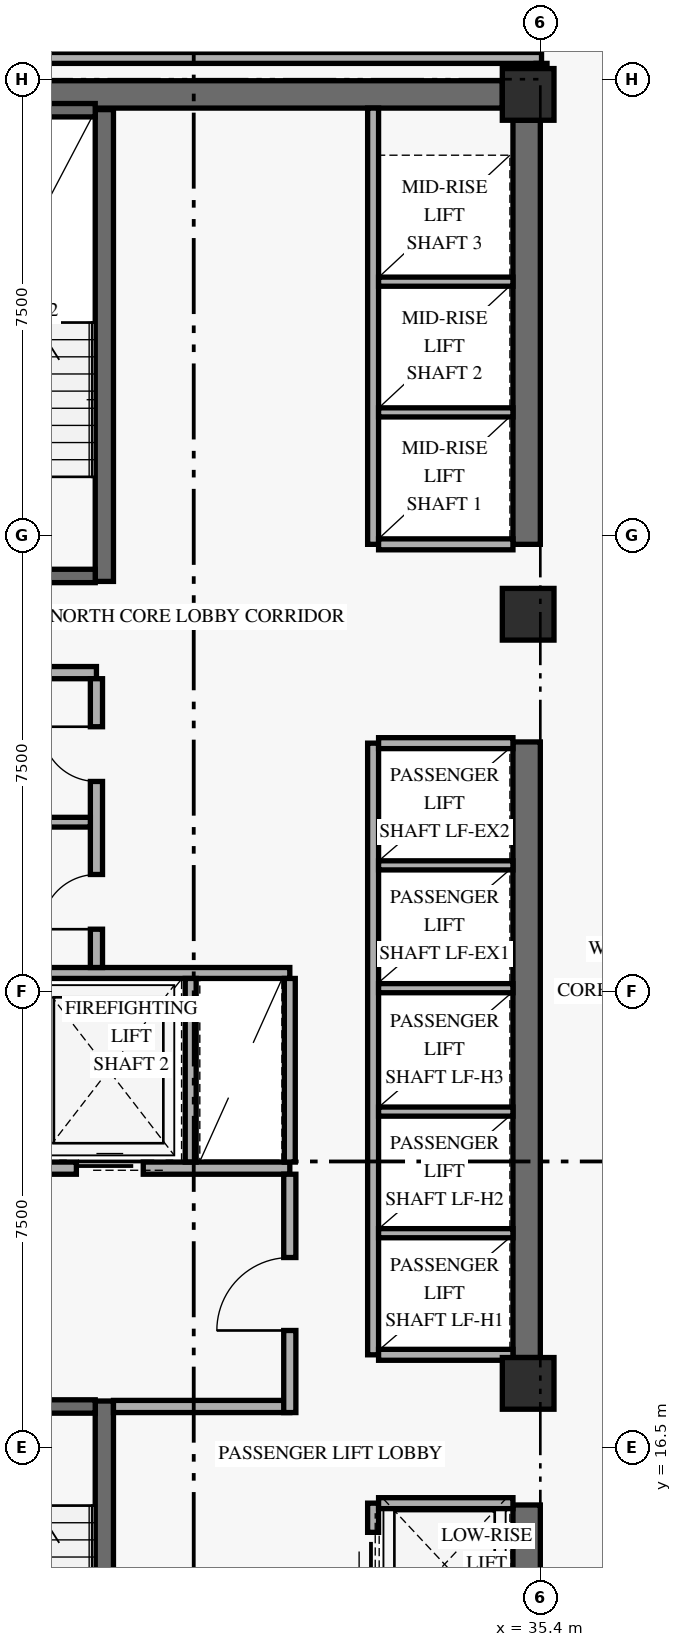
"""IFC4 building model, lengths in metres.
Left out: names, types, materials, properties, quantities, classifications, styles, units other than length and angle.
Written with IfcOpenShell. Run it as: python <this file> out.ifc"""

import sys

from ifc_helpers import new_model, si_unit, direction, frame, frame_2d, origin, origin_2d, place, context, subcontext, project, spatial, rectangle, extrude, element, fill, save


model = new_model("IFC4")
c1 = context("Model", 3, precision=1e-05, world=origin(), true_north=direction((0.0, 1.0)))
c2 = subcontext(c1, "Body", "Model", "MODEL_VIEW")
j1 = project(units=[si_unit("LENGTHUNIT", "METRE"), si_unit("PLANEANGLEUNIT", "RADIAN")], contexts=[c1])
p1 = place(None, origin())
s1 = spatial("IfcSite", under=j1, at=p1, CompositionType="ELEMENT")
p2 = place(p1, origin())
s2 = spatial("IfcBuilding", under=s1, at=p2, CompositionType="ELEMENT")
p3 = place(p2, frame((0.0, 0.0, 76.8)))
s3 = spatial("IfcBuildingStorey", under=s2, at=p3, CompositionType="ELEMENT", Elevation=76.8)
p4 = place(p3, frame((35.175, 9.675, 0.0), z_axis=(0.0, 0.0, 1.0), x_axis=(0.0, 1.0, 0.0)))
e1 = element("IfcWall", 1, at=p4, inside=s3, PredefinedType="SHEAR", context=c2, shape_type="SweptSolid", body=[
    extrude(rectangle(XDim=5.875, YDim=0.45, at=frame_2d((2.938, 0.0))), origin(), (0.0, 0.0, 1.0), 2.749),
])
p5 = place(p3, frame((35.175, 17.975, 0.0), z_axis=(0.0, 0.0, 1.0), x_axis=(0.0, 1.0, 0.0)))
e2 = element("IfcWall", 2, at=p5, inside=s3, PredefinedType="SHEAR", context=c2, shape_type="SweptSolid", body=[
    extrude(rectangle(XDim=10.125, YDim=0.45, at=frame_2d((5.062, 0.0))), origin(), (0.0, 0.0, 1.0), 2.749),
])
p6 = place(p3, frame((35.175, 31.35, 0.0), z_axis=(0.0, 0.0, 1.0), x_axis=(0.0, 1.0, 0.0)))
e3 = element("IfcWall", 3, at=p6, inside=s3, PredefinedType="SHEAR", context=c2, shape_type="SweptSolid", body=[
    extrude(rectangle(XDim=6.975, YDim=0.45, at=frame_2d((3.487, 0.0))), origin(), (0.0, 0.0, 1.0), 2.749),
])
p7 = place(p3, frame((24.625, 38.75, 0.0), z_axis=(0.0, 0.0, 1.0), x_axis=(1.0, 0.0, 0.0)))
e4 = element("IfcWall", 4, at=p7, inside=s3, PredefinedType="SHEAR", context=c2, shape_type="SweptSolid", body=[
    extrude(rectangle(XDim=10.15, YDim=0.45, at=frame_2d((5.075, 0.0))), origin(), (0.0, 0.0, 1.0), 3.36),
])
p8 = place(p3, frame((28.23, 9.5, 0.0), z_axis=(0.0, 0.0, 1.0), x_axis=(0.0, 1.0, 0.0)))
e5 = element("IfcWall", 5, at=p8, inside=s3, PredefinedType="SHEAR", context=c2, shape_type="SweptSolid", body=[
    extrude(rectangle(XDim=7.76, YDim=0.3, at=frame_2d((3.88, 0.0))), origin(), (0.0, 0.0, 1.0), 3.36),
])
p9 = place(p3, frame((24.92, 17.17, 0.0), z_axis=(0.0, 0.0, 1.0), x_axis=(1.0, 0.0, 0.0)))
e6 = element("IfcWall", 6, at=p9, inside=s3, PredefinedType="SHEAR", context=c2, shape_type="SweptSolid", body=[
    extrude(rectangle(XDim=3.16, YDim=0.22, at=frame_2d((1.58, 0.0))), origin(), (0.0, 0.0, 1.0), 3.36),
])
p10 = place(p9, frame((0.78, 0.0, 0.0)))
e7 = element("IfcOpeningElement", 7, at=p10, cuts=e6, PredefinedType="OPENING", context=c2, shape_type="SweptSolid", body=[
    extrude(rectangle(XDim=1.05, YDim=2.15, at=frame_2d((0.525, 1.075))), frame((0.0, 0.12, 0.0), z_axis=(0.0, -1.0, 0.0), x_axis=(1.0, 0.0, 0.0)), (0.0, 0.0, 1.0), 0.24),
])
p11 = place(p3, frame((28.23, 30.74, 0.0), z_axis=(0.0, 0.0, 1.0), x_axis=(0.0, 1.0, 0.0)))
e8 = element("IfcWall", 8, at=p11, inside=s3, PredefinedType="SHEAR", context=c2, shape_type="SweptSolid", body=[
    extrude(rectangle(XDim=7.76, YDim=0.3, at=frame_2d((3.88, 0.0))), origin(), (0.0, 0.0, 1.0), 3.36),
])
p12 = place(p3, frame((24.92, 30.83, 0.0), z_axis=(0.0, 0.0, 1.0), x_axis=(1.0, 0.0, 0.0)))
e9 = element("IfcWall", 9, at=p12, inside=s3, PredefinedType="SHEAR", context=c2, shape_type="SweptSolid", body=[
    extrude(rectangle(XDim=3.16, YDim=0.22, at=frame_2d((1.58, 0.0))), origin(), (0.0, 0.0, 1.0), 3.36),
])
p13 = place(p12, frame((0.78, 0.0, 0.0)))
e10 = element("IfcOpeningElement", 10, at=p13, cuts=e9, PredefinedType="OPENING", context=c2, shape_type="SweptSolid", body=[
    extrude(rectangle(XDim=1.05, YDim=2.15, at=frame_2d((0.525, 1.075))), frame((0.0, 0.12, 0.0), z_axis=(0.0, -1.0, 0.0), x_axis=(1.0, 0.0, 0.0)), (0.0, 0.0, 1.0), 0.24),
])
p14 = place(p3, frame((24.92, 38.49, 0.0), z_axis=(0.0, 0.0, 1.0), x_axis=(1.0, 0.0, 0.0)))
e11 = element("IfcWall", 11, at=p14, inside=s3, PredefinedType="SHEAR", context=c2, shape_type="SweptSolid", body=[
    extrude(rectangle(XDim=3.16, YDim=0.22, at=frame_2d((1.58, 0.0))), origin(), (0.0, 0.0, 1.0), 3.36),
])
for number, where, z_axis, x_axis in (
    (12, (35.2, 17.55, 0.0), (0.0, 0.0, 1.0), (1.0, 0.0, 0.0)),
    (13, (35.2, 30.2, 0.0), (0.0, 0.0, 1.0), (1.0, 0.0, 0.0)),
    (14, (35.2, 38.75, 0.0), (0.0, 0.0, 1.0), (1.0, 0.0, 0.0)),
):
    element("IfcColumn", number, at=place(p3, frame(where, z_axis=z_axis, x_axis=x_axis)), inside=s3, PredefinedType="COLUMN", context=c2, shape_type="SweptSolid", body=[
        extrude(rectangle(XDim=0.85, YDim=0.85, at=origin_2d()), origin(), (0.0, 0.0, 1.0), 3.6),
    ])
p15 = place(p3, frame((24.45, 21.09, 0.0), z_axis=(0.0, 0.0, 1.0), x_axis=(1.0, 0.0, 0.0)))
e15 = element("IfcWall", 15, at=p15, inside=s3, PredefinedType="STANDARD", context=c2, shape_type="SweptSolid", body=[
    extrude(rectangle(XDim=6.83, YDim=0.2, at=frame_2d((3.415, 0.0))), origin(), (0.0, 0.0, 1.0), 3.36),
])
p16 = place(p15, frame((0.72, 0.0, 0.0)))
e16 = element("IfcOpeningElement", 16, at=p16, cuts=e15, PredefinedType="OPENING", context=c2, shape_type="SweptSolid", body=[
    extrude(rectangle(XDim=1.1, YDim=2.2, at=frame_2d((0.55, 1.1))), frame((0.0, 0.11, 0.0), z_axis=(0.0, -1.0, 0.0), x_axis=(1.0, 0.0, 0.0)), (0.0, 0.0, 1.0), 0.22),
])
p17 = place(p15, frame((3.32, 0.0, 0.0)))
e17 = element("IfcOpeningElement", 17, at=p17, cuts=e15, PredefinedType="OPENING", context=c2, shape_type="SweptSolid", body=[
    extrude(rectangle(XDim=1.1, YDim=2.2, at=frame_2d((0.55, 1.1))), frame((0.0, 0.11, 0.0), z_axis=(0.0, -1.0, 0.0), x_axis=(1.0, 0.0, 0.0)), (0.0, 0.0, 1.0), 0.22),
])
p18 = place(p3, frame((28.38, 17.17, 0.0), z_axis=(0.0, 0.0, 1.0), x_axis=(1.0, 0.0, 0.0)))
e18 = element("IfcWall", 18, at=p18, inside=s3, PredefinedType="STANDARD", context=c2, shape_type="SweptSolid", body=[
    extrude(rectangle(XDim=2.9, YDim=0.2, at=frame_2d((1.45, 0.0))), origin(), (0.0, 0.0, 1.0), 3.36),
])
p19 = place(p3, frame((31.28, 17.07, 0.0), z_axis=(0.0, 0.0, 1.0), x_axis=(0.0, 1.0, 0.0)))
e19 = element("IfcWall", 19, at=p19, inside=s3, PredefinedType="STANDARD", context=c2, shape_type="SweptSolid", body=[
    extrude(rectangle(XDim=3.92, YDim=0.2, at=frame_2d((1.96, 0.0))), origin(), (0.0, 0.0, 1.0), 2.731),
])
p20 = place(p19, frame((1.35, 0.0, 0.0)))
e20 = element("IfcOpeningElement", 20, at=p20, cuts=e19, PredefinedType="OPENING", context=c2, shape_type="SweptSolid", body=[
    extrude(rectangle(XDim=1.2, YDim=2.15, at=frame_2d((0.6, 1.075))), frame((0.0, 0.11, 0.0), z_axis=(0.0, -1.0, 0.0), x_axis=(1.0, 0.0, 0.0)), (0.0, 0.0, 1.0), 0.22),
])
p21 = place(p3, frame((24.45, 24.3, 0.0), z_axis=(0.0, 0.0, 1.0), x_axis=(1.0, 0.0, 0.0)))
e21 = element("IfcWall", 21, at=p21, inside=s3, PredefinedType="STANDARD", context=c2, shape_type="SweptSolid", body=[
    extrude(rectangle(XDim=6.83, YDim=0.18, at=frame_2d((3.415, 0.0))), origin(), (0.0, 0.0, 1.0), 3.36),
])
for number, where, z_axis, x_axis in (
    (22, (29.65, 21.19, 0.0), (0.0, 0.0, 1.0), (0.0, 1.0, 0.0)),
    (23, (31.28, 21.19, 0.0), (0.0, 0.0, 1.0), (0.0, 1.0, 0.0)),
):
    element("IfcWall", number, at=place(p3, frame(where, z_axis=z_axis, x_axis=x_axis)), inside=s3, PredefinedType="STANDARD", context=c2, shape_type="SweptSolid", body=[
        extrude(rectangle(XDim=3.02, YDim=0.18, at=frame_2d((1.51, 0.0))), origin(), (0.0, 0.0, 1.0), 3.36),
    ])
p22 = place(p3, frame((24.45, 29.24, 0.0), z_axis=(0.0, 0.0, 1.0), x_axis=(1.0, 0.0, 0.0)))
e24 = element("IfcWall", 24, at=p22, inside=s3, PredefinedType="STANDARD", context=c2, shape_type="SweptSolid", body=[
    extrude(rectangle(XDim=3.65, YDim=0.2, at=frame_2d((1.825, 0.0))), origin(), (0.0, 0.0, 1.0), 3.36),
])
p23 = place(p3, frame((28.1, 24.39, 0.0), z_axis=(0.0, 0.0, 1.0), x_axis=(0.0, 1.0, 0.0)))
e25 = element("IfcWall", 25, at=p23, inside=s3, PredefinedType="STANDARD", context=c2, shape_type="SweptSolid", body=[
    extrude(rectangle(XDim=4.75, YDim=0.2, at=frame_2d((2.375, 0.0))), origin(), (0.0, 0.0, 1.0), 3.36),
])
p24 = place(p23, frame((0.63, 0.0, 0.0)))
e26 = element("IfcOpeningElement", 26, at=p24, cuts=e25, PredefinedType="OPENING", context=c2, shape_type="SweptSolid", body=[
    extrude(rectangle(XDim=0.9, YDim=2.1, at=frame_2d((0.45, 1.05))), frame((0.0, 0.11, 0.0), z_axis=(0.0, -1.0, 0.0), x_axis=(1.0, 0.0, 0.0)), (0.0, 0.0, 1.0), 0.22),
])
p25 = place(p23, frame((3.06, 0.0, 0.0)))
e27 = element("IfcOpeningElement", 27, at=p25, cuts=e25, PredefinedType="OPENING", context=c2, shape_type="SweptSolid", body=[
    extrude(rectangle(XDim=0.9, YDim=2.1, at=frame_2d((0.45, 1.05))), frame((0.0, 0.11, 0.0), z_axis=(0.0, -1.0, 0.0), x_axis=(1.0, 0.0, 0.0)), (0.0, 0.0, 1.0), 0.22),
])
p26 = place(p3, frame((24.45, 26.78, 0.0), z_axis=(0.0, 0.0, 1.0), x_axis=(1.0, 0.0, 0.0)))
e28 = element("IfcWall", 28, at=p26, inside=s3, PredefinedType="PARTITIONING", context=c2, shape_type="SweptSolid", body=[
    extrude(rectangle(XDim=3.55, YDim=0.16, at=frame_2d((1.775, 0.0))), origin(), (0.0, 0.0, 1.0), 3.36),
])
p27 = place(p3, frame((32.65, 9.5, 0.0), z_axis=(0.0, 0.0, 1.0), x_axis=(0.0, 1.0, 0.0)))
e29 = element("IfcWall", 29, at=p27, inside=s3, PredefinedType="STANDARD", context=c2, shape_type="SweptSolid", body=[
    extrude(rectangle(XDim=6.08, YDim=0.18, at=frame_2d((3.04, 0.0))), origin(), (0.0, 0.0, 1.0), 3.36),
])
p28 = place(p27, frame((0.55, 0.0, 0.0)))
e30 = element("IfcOpeningElement", 30, at=p28, cuts=e29, PredefinedType="OPENING", context=c2, shape_type="SweptSolid", body=[
    extrude(rectangle(XDim=1.05, YDim=2.2, at=frame_2d((0.525, 1.1))), frame((0.0, 0.1, 0.0), z_axis=(0.0, -1.0, 0.0), x_axis=(1.0, 0.0, 0.0)), (0.0, 0.0, 1.0), 0.2),
])
p29 = place(p27, frame((2.55, 0.0, 0.0)))
e31 = element("IfcOpeningElement", 31, at=p29, cuts=e29, PredefinedType="OPENING", context=c2, shape_type="SweptSolid", body=[
    extrude(rectangle(XDim=1.05, YDim=2.2, at=frame_2d((0.525, 1.1))), frame((0.0, 0.1, 0.0), z_axis=(0.0, -1.0, 0.0), x_axis=(1.0, 0.0, 0.0)), (0.0, 0.0, 1.0), 0.2),
])
p30 = place(p27, frame((4.55, 0.0, 0.0)))
e32 = element("IfcOpeningElement", 32, at=p30, cuts=e29, PredefinedType="OPENING", context=c2, shape_type="SweptSolid", body=[
    extrude(rectangle(XDim=1.05, YDim=2.2, at=frame_2d((0.525, 1.1))), frame((0.0, 0.1, 0.0), z_axis=(0.0, -1.0, 0.0), x_axis=(1.0, 0.0, 0.0)), (0.0, 0.0, 1.0), 0.2),
])
p31 = place(p3, frame((32.74, 15.58, 0.0), z_axis=(0.0, 0.0, 1.0), x_axis=(1.0, 0.0, 0.0)))
e33 = element("IfcWall", 33, at=p31, inside=s3, PredefinedType="STANDARD", context=c2, shape_type="SweptSolid", body=[
    extrude(rectangle(XDim=2.21, YDim=0.18, at=frame_2d((1.105, 0.0))), origin(), (0.0, 0.0, 1.0), 3.36),
])
p32 = place(p3, frame((32.65, 18.02, 0.0), z_axis=(0.0, 0.0, 1.0), x_axis=(0.0, 1.0, 0.0)))
e34 = element("IfcWall", 34, at=p32, inside=s3, PredefinedType="STANDARD", context=c2, shape_type="SweptSolid", body=[
    extrude(rectangle(XDim=10.06, YDim=0.18, at=frame_2d((5.03, 0.0))), origin(), (0.0, 0.0, 1.0), 3.36),
])
for number, where, z_axis, x_axis in (
    (35, (32.74, 18.02, 0.0), (0.0, 0.0, 1.0), (1.0, 0.0, 0.0)),
    (36, (32.74, 28.08, 0.0), (0.0, 0.0, 1.0), (1.0, 0.0, 0.0)),
):
    element("IfcWall", number, at=place(p3, frame(where, z_axis=z_axis, x_axis=x_axis)), inside=s3, PredefinedType="STANDARD", context=c2, shape_type="SweptSolid", body=[
        extrude(rectangle(XDim=2.21, YDim=0.18, at=frame_2d((1.105, 0.0))), origin(), (0.0, 0.0, 1.0), 3.36),
    ])
for number, where, z_axis, x_axis in (
    (37, (32.74, 20.02, 0.0), (0.0, 0.0, 1.0), (1.0, 0.0, 0.0)),
    (38, (32.74, 22.02, 0.0), (0.0, 0.0, 1.0), (1.0, 0.0, 0.0)),
    (39, (32.74, 24.05, 0.0), (0.0, 0.0, 1.0), (1.0, 0.0, 0.0)),
    (40, (32.74, 26.07, 0.0), (0.0, 0.0, 1.0), (1.0, 0.0, 0.0)),
):
    element("IfcWall", number, at=place(p3, frame(where, z_axis=z_axis, x_axis=x_axis)), inside=s3, PredefinedType="STANDARD", context=c2, shape_type="SweptSolid", body=[
        extrude(rectangle(XDim=2.21, YDim=0.15, at=frame_2d((1.105, 0.0))), origin(), (0.0, 0.0, 1.0), 3.36),
    ])
p33 = place(p3, frame((32.65, 31.35, 0.0), z_axis=(0.0, 0.0, 1.0), x_axis=(0.0, 1.0, 0.0)))
e41 = element("IfcWall", 41, at=p33, inside=s3, PredefinedType="STANDARD", context=c2, shape_type="SweptSolid", body=[
    extrude(rectangle(XDim=7.175, YDim=0.18, at=frame_2d((3.587, 0.0))), origin(), (0.0, 0.0, 1.0), 3.36),
])
p34 = place(p3, frame((32.74, 31.35, 0.0), z_axis=(0.0, 0.0, 1.0), x_axis=(1.0, 0.0, 0.0)))
e42 = element("IfcWall", 42, at=p34, inside=s3, PredefinedType="STANDARD", context=c2, shape_type="SweptSolid", body=[
    extrude(rectangle(XDim=2.21, YDim=0.18, at=frame_2d((1.105, 0.0))), origin(), (0.0, 0.0, 1.0), 3.36),
])
for number, where, z_axis, x_axis in (
    (43, (32.74, 33.52, 0.0), (0.0, 0.0, 1.0), (1.0, 0.0, 0.0)),
    (44, (32.74, 35.67, 0.0), (0.0, 0.0, 1.0), (1.0, 0.0, 0.0)),
):
    element("IfcWall", number, at=place(p3, frame(where, z_axis=z_axis, x_axis=x_axis)), inside=s3, PredefinedType="STANDARD", context=c2, shape_type="SweptSolid", body=[
        extrude(rectangle(XDim=2.21, YDim=0.15, at=frame_2d((1.105, 0.0))), origin(), (0.0, 0.0, 1.0), 3.36),
    ])
p35 = place(p3, frame((23.75, 39.35, 0.0), z_axis=(0.0, 0.0, 1.0), x_axis=(1.0, 0.0, 0.0)))
e45 = element("IfcWall", 45, at=p35, inside=s3, PredefinedType="STANDARD", context=c2, shape_type="SweptSolid", body=[
    extrude(rectangle(XDim=11.67, YDim=0.18, at=frame_2d((5.835, 0.0))), origin(), (0.0, 0.0, 1.0), 2.731),
])
p36 = place(p3, frame((35.42, 38.75, 0.0), z_axis=(0.0, 0.0, 1.0), x_axis=(0.0, 1.0, 0.0)))
e46 = element("IfcWall", 46, at=p36, inside=s3, PredefinedType="STANDARD", context=c2, shape_type="SweptSolid", body=[
    extrude(rectangle(XDim=0.51, YDim=0.18, at=frame_2d((0.255, 0.0))), origin(), (0.0, 0.0, 1.0), 2.731),
])
p37 = place(p17, origin())
e47 = element("IfcDoor", 47, at=p37, inside=s3, OperationType="SLIDING_TO_LEFT", PredefinedType="DOOR", context=c2, shape_type="SweptSolid", body=[
    extrude(rectangle(XDim=1.1, YDim=2.2, at=frame_2d((0.55, 1.1))), frame((0.0, 0.025, 0.0), z_axis=(0.0, -1.0, 0.0), x_axis=(1.0, 0.0, 0.0)), (0.0, 0.0, 1.0), 0.05),
])
fill(e17, e47)
p38 = place(p20, origin())
e48 = element("IfcDoor", 48, at=p38, inside=s3, OperationType="SINGLE_SWING_LEFT", PredefinedType="DOOR", context=c2, shape_type="SweptSolid", body=[
    extrude(rectangle(XDim=1.2, YDim=2.15, at=frame_2d((0.6, 1.075))), frame((0.0, 0.025, 0.0), z_axis=(0.0, -1.0, 0.0), x_axis=(1.0, 0.0, 0.0)), (0.0, 0.0, 1.0), 0.05),
])
fill(e20, e48)
p39 = place(p24, origin())
e49 = element("IfcDoor", 49, at=p39, inside=s3, OperationType="SINGLE_SWING_LEFT", PredefinedType="DOOR", context=c2, shape_type="SweptSolid", body=[
    extrude(rectangle(XDim=0.9, YDim=2.1, at=frame_2d((0.45, 1.05))), frame((0.0, 0.025, 0.0), z_axis=(0.0, -1.0, 0.0), x_axis=(1.0, 0.0, 0.0)), (0.0, 0.0, 1.0), 0.05),
])
fill(e26, e49)
p40 = place(p25, origin())
e50 = element("IfcDoor", 50, at=p40, inside=s3, OperationType="SINGLE_SWING_RIGHT", PredefinedType="DOOR", context=c2, shape_type="SweptSolid", body=[
    extrude(rectangle(XDim=0.9, YDim=2.1, at=frame_2d((0.45, 1.05))), frame((0.0, 0.025, 0.0), z_axis=(0.0, -1.0, 0.0), x_axis=(1.0, 0.0, 0.0)), (0.0, 0.0, 1.0), 0.05),
])
fill(e27, e50)
p41 = place(p30, origin())
e51 = element("IfcDoor", 51, at=p41, inside=s3, OperationType="SLIDING_TO_LEFT", PredefinedType="DOOR", context=c2, shape_type="SweptSolid", body=[
    extrude(rectangle(XDim=1.05, YDim=2.2, at=frame_2d((0.525, 1.1))), frame((0.0, 0.025, 0.0), z_axis=(0.0, -1.0, 0.0), x_axis=(1.0, 0.0, 0.0)), (0.0, 0.0, 1.0), 0.05),
])
fill(e32, e51)
save(model, sys.argv[1])
